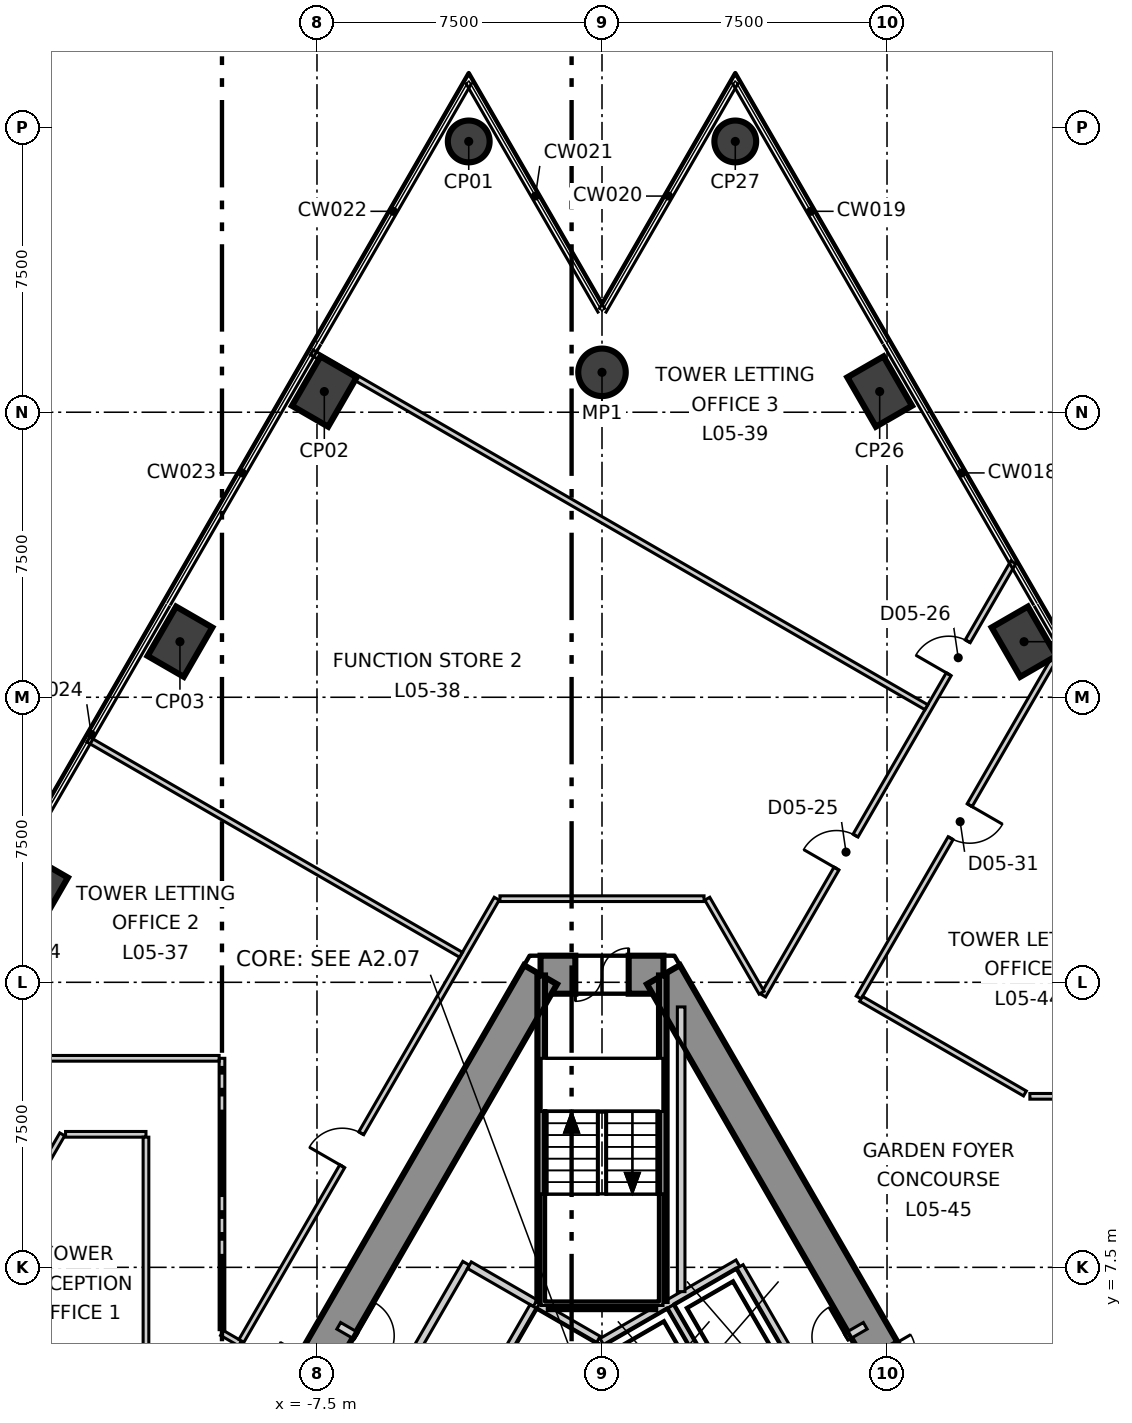
"""IFC4 building model, lengths in metres.
Left out: names, types, materials, properties, quantities, classifications, styles, units other than length and angle.
Written with IfcOpenShell. Run it as: python <this file> out.ifc"""

import sys

from ifc_helpers import new_model, si_unit, direction, frame, frame_2d, origin, origin_2d, place, context, subcontext, project, spatial, polyline, rectangle, circle, outline, extrude, element, fill, save


model = new_model("IFC4")
c1 = context("Model", 3, precision=1e-05, world=origin(), true_north=direction((0.0, 1.0)))
c2 = subcontext(c1, "Body", "Model", "MODEL_VIEW")
j1 = project(units=[si_unit("LENGTHUNIT", "METRE"), si_unit("PLANEANGLEUNIT", "RADIAN")], contexts=[c1])
p1 = place(None, origin())
s1 = spatial("IfcSite", under=j1, at=p1, CompositionType="ELEMENT")
p2 = place(p1, origin())
s2 = spatial("IfcBuilding", under=s1, at=p2, CompositionType="ELEMENT")
p3 = place(p2, frame((0.0, 0.0, 30.3)))
s3 = spatial("IfcBuildingStorey", under=s2, at=p3, CompositionType="ELEMENT", Elevation=30.3)
p4 = place(p3, frame((1.617, 15.2, -0.4), z_axis=(0.0, 0.0, 1.0), x_axis=(-1.0, 0.0, 0.0)))
e1 = element("IfcWall", 1, at=p4, inside=s3, PredefinedType="SHEAR", context=c2, shape_type="SweptSolid", body=[
    extrude(outline(polyline([(-0.288, -0.5), (1.617, -0.5), (3.522, -0.5), (2.945, 0.5), (1.617, 0.5), (0.289, 0.5), (-0.288, -0.5)])), origin(), (0.0, 0.0, 1.0), 5.1),
])
p5 = place(p4, frame((0.917, 0.0, 0.4)))
e2 = element("IfcOpeningElement", 2, at=p5, cuts=e1, PredefinedType="OPENING", context=c2, shape_type="SweptSolid", body=[
    extrude(rectangle(XDim=1.4, YDim=2.1, at=frame_2d((0.7, 1.05))), frame((0.0, 0.51, 0.0), z_axis=(0.0, -1.0, 0.0), x_axis=(1.0, 0.0, 0.0)), (0.0, 0.0, 1.0), 1.02),
])
p6 = place(p3, frame((-1.617, 15.2, -0.4), z_axis=(0.0, 0.0, 1.0), x_axis=(-0.499992141631, -0.866029940768, 0.0)))
e3 = element("IfcWall", 3, at=p6, inside=s3, PredefinedType="SHEAR", context=c2, shape_type="SweptSolid", body=[
    extrude(outline(polyline([(-0.289, -0.499), (1.656, -0.499), (3.601, -0.499), (5.547, -0.499), (7.492, -0.499), (9.437, -0.5), (11.382, -0.5), (13.328, -0.5), (15.273, -0.5), (17.218, -0.5), (19.163, -0.5), (21.109, -0.5), (23.054, -0.5), (24.999, -0.5), (24.422, 0.5), (22.566, 0.5), (20.709, 0.5), (18.853, 0.5), (16.997, 0.5), (15.14, 0.5), (13.284, 0.5), (11.427, 0.5), (9.571, 0.5), (7.715, 0.5), (5.858, 0.5), (4.002, 0.5), (2.146, 0.5), (0.289, 0.5), (-0.289, -0.499)])), origin(), (0.0, 0.0, 1.0), 5.1),
])
p7 = place(p6, frame((11.805, 0.0, 0.4)))
e4 = element("IfcOpeningElement", 4, at=p7, cuts=e3, PredefinedType="OPENING", context=c2, shape_type="SweptSolid", body=[
    extrude(rectangle(XDim=1.1, YDim=2.1, at=frame_2d((0.55, 1.05))), frame((0.0, 0.51, 0.0), z_axis=(0.0, -1.0, 0.0), x_axis=(1.0, 0.0, 0.0)), (0.0, 0.0, 1.0), 1.02),
])
p8 = place(p3, frame((13.972, -6.2, -0.4), z_axis=(0.0, 0.0, 1.0), x_axis=(-0.499992141631, 0.866029940768, 0.0)))
e5 = element("IfcWall", 5, at=p8, inside=s3, PredefinedType="SHEAR", context=c2, shape_type="SweptSolid", body=[
    extrude(outline(polyline([(-0.288, -0.5), (1.657, -0.5), (3.602, -0.5), (5.547, -0.5), (7.493, -0.5), (9.438, -0.5), (11.383, -0.5), (13.328, -0.5), (15.273, -0.5), (17.218, -0.499), (19.164, -0.499), (21.109, -0.499), (23.054, -0.499), (24.999, -0.499), (24.422, 0.5), (22.566, 0.5), (20.709, 0.5), (18.853, 0.5), (16.996, 0.5), (15.14, 0.5), (13.283, 0.5), (11.427, 0.5), (9.57, 0.5), (7.714, 0.5), (5.857, 0.5), (4.001, 0.5), (2.145, 0.5), (0.288, 0.5), (-0.288, -0.5)])), origin(), (0.0, 0.0, 1.0), 5.1),
])
p9 = place(p8, frame((11.455, 0.0, 0.4)))
e6 = element("IfcOpeningElement", 6, at=p9, cuts=e5, PredefinedType="OPENING", context=c2, shape_type="SweptSolid", body=[
    extrude(rectangle(XDim=1.8, YDim=2.1, at=frame_2d((0.9, 1.05))), frame((0.0, 0.51, 0.0), z_axis=(0.0, -1.0, 0.0), x_axis=(1.0, 0.0, 0.0)), (0.0, 0.0, 1.0), 1.02),
])
p10 = place(p3, frame((-3.507, 37.125, -0.4), z_axis=(0.0, 0.0, 1.0), x_axis=(0.5, 0.866025403784, 0.0)))
e7 = element("IfcColumn", 7, at=p10, inside=s3, PredefinedType="COLUMN", context=c2, shape_type="SweptSolid", body=[
    extrude(circle(Radius=0.55, at=origin_2d()), origin(), (0.0, 0.0, 1.0), 5.1),
])
for number, where, z_axis, x_axis in (
    (8, (-7.307, 30.544, -0.4), (0.0, 0.0, 1.0), (0.5, 0.866, 0.0)),
    (9, (-11.106, 23.962, -0.4), (0.0, 0.0, 1.0), (0.5, 0.866, 0.0)),
    (10, (-14.906, 17.381, -0.4), (0.0, 0.0, 1.0), (0.5, 0.866, 0.0)),
    (11, (11.106, 23.962, -0.4), (0.0, 0.0, 1.0), (-0.5, 0.866, 0.0)),
    (12, (7.307, 30.544, -0.4), (0.0, 0.0, 1.0), (-0.5, 0.866, 0.0)),
):
    element("IfcColumn", number, at=place(p3, frame(where, z_axis=z_axis, x_axis=x_axis)), inside=s3, PredefinedType="COLUMN", context=c2, shape_type="SweptSolid", body=[
        extrude(rectangle(XDim=1.5, YDim=1.1, at=origin_2d()), origin(), (0.0, 0.0, 1.0), 5.1),
    ])
p11 = place(p3, frame((3.507, 37.125, -0.4), z_axis=(0.0, 0.0, 1.0), x_axis=(-0.5, 0.866025403784, 0.0)))
e13 = element("IfcColumn", 13, at=p11, inside=s3, PredefinedType="COLUMN", context=c2, shape_type="SweptSolid", body=[
    extrude(circle(Radius=0.55, at=origin_2d()), origin(), (0.0, 0.0, 1.0), 5.1),
])
p12 = place(p3, frame((0.0, 31.05, -0.4), z_axis=(0.0, 0.0, 1.0), x_axis=(1.0, 0.0, 0.0)))
e14 = element("IfcColumn", 14, at=p12, inside=s3, PredefinedType="COLUMN", context=c2, shape_type="SweptSolid", body=[
    extrude(circle(Radius=0.625, at=origin_2d()), origin(), (0.0, 0.0, 1.0), 5.1),
])
p13 = place(p3, frame((-10.0, 5.773, 0.0), z_axis=(0.0, 0.0, 1.0), x_axis=(0.866645846342, -0.498923818852, 0.0)))
e15 = element("IfcWall", 15, at=p13, inside=s3, PredefinedType="PARTITIONING", context=c2, shape_type="SweptSolid", body=[
    extrude(rectangle(XDim=0.547, YDim=0.15, at=frame_2d((0.273, 0.0))), origin(), (0.0, 0.0, 1.0), 4.2),
])
p14 = place(p3, frame((-9.489, 5.565, 0.0), z_axis=(0.0, 0.0, 1.0), x_axis=(0.500030231307, 0.866007949028, 0.0)))
e16 = element("IfcWall", 16, at=p14, inside=s3, PredefinedType="PARTITIONING", context=c2, shape_type="SweptSolid", body=[
    extrude(rectangle(XDim=13.435, YDim=0.15, at=frame_2d((6.718, 0.0))), origin(), (0.0, 0.0, 1.0), 4.7),
])
p15 = place(p14, frame((5.307, 0.0, 0.0)))
e17 = element("IfcOpeningElement", 17, at=p15, cuts=e16, PredefinedType="OPENING", context=c2, shape_type="SweptSolid", body=[
    extrude(rectangle(XDim=1.0, YDim=2.1, at=frame_2d((0.5, 1.05))), frame((0.0, 0.085, 0.0), z_axis=(0.0, -1.0, 0.0), x_axis=(1.0, 0.0, 0.0)), (0.0, 0.0, 1.0), 0.17),
])
p16 = place(p3, frame((4.242, 14.652, 0.0), z_axis=(0.0, 0.0, 1.0), x_axis=(0.500016782699, 0.866015714072, 0.0)))
e18 = element("IfcWall", 18, at=p16, inside=s3, PredefinedType="PARTITIONING", context=c2, shape_type="SweptSolid", body=[
    extrude(rectangle(XDim=13.164, YDim=0.15, at=frame_2d((6.582, 0.0))), origin(), (0.0, 0.0, 1.0), 4.7),
])
p17 = place(p16, frame((3.858, 0.0, 0.0)))
e19 = element("IfcOpeningElement", 19, at=p17, cuts=e18, PredefinedType="OPENING", context=c2, shape_type="SweptSolid", body=[
    extrude(rectangle(XDim=1.0, YDim=2.1, at=frame_2d((0.5, 1.05))), frame((0.0, 0.085, 0.0), z_axis=(0.0, -1.0, 0.0), x_axis=(1.0, 0.0, 0.0)), (0.0, 0.0, 1.0), 0.17),
])
p18 = place(p16, frame((9.763, 0.0, 0.0)))
e20 = element("IfcOpeningElement", 20, at=p18, cuts=e18, PredefinedType="OPENING", context=c2, shape_type="SweptSolid", body=[
    extrude(rectangle(XDim=1.0, YDim=2.1, at=frame_2d((0.5, 1.05))), frame((0.0, 0.085, 0.0), z_axis=(0.0, -1.0, 0.0), x_axis=(1.0, 0.0, 0.0)), (0.0, 0.0, 1.0), 0.17),
])
p19 = place(p3, frame((-10.0, 5.86, 0.0), z_axis=(0.0, 0.0, 1.0), x_axis=(0.0, 1.0, 0.0)))
e21 = element("IfcWall", 21, at=p19, inside=s3, PredefinedType="PARTITIONING", context=c2, shape_type="SweptSolid", body=[
    extrude(rectangle(XDim=7.14, YDim=0.15, at=frame_2d((3.57, 0.0))), origin(), (0.0, 0.0, 1.0), 4.7),
])
p20 = place(p3, frame((-15.271, 13.0, 0.0), z_axis=(0.0, 0.0, 1.0), x_axis=(1.0, 0.0, 0.0)))
e22 = element("IfcWall", 22, at=p20, inside=s3, PredefinedType="PARTITIONING", context=c2, shape_type="SweptSolid", body=[
    extrude(rectangle(XDim=5.196, YDim=0.15, at=frame_2d((2.598, 0.0))), origin(), (0.0, 0.0, 1.0), 4.7),
])
p21 = place(p3, frame((6.754, 14.601, 0.0), z_axis=(0.0, 0.0, 1.0), x_axis=(0.499932177464, 0.866064557603, 0.0)))
e23 = element("IfcWall", 23, at=p21, inside=s3, PredefinedType="PARTITIONING", context=c2, shape_type="SweptSolid", body=[
    extrude(rectangle(XDim=10.682, YDim=0.15, at=frame_2d((5.341, 0.0))), origin(), (0.0, 0.0, 1.0), 4.1),
])
p22 = place(p21, frame((4.841, 0.0, 0.0)))
e24 = element("IfcOpeningElement", 24, at=p22, cuts=e23, PredefinedType="OPENING", context=c2, shape_type="SweptSolid", body=[
    extrude(rectangle(XDim=1.0, YDim=2.1, at=frame_2d((0.5, 1.05))), frame((0.0, 0.085, 0.0), z_axis=(0.0, -1.0, 0.0), x_axis=(1.0, 0.0, 0.0)), (0.0, 0.0, 1.0), 0.17),
])
p23 = place(p3, frame((-13.517, 21.387, 0.0), z_axis=(0.0, 0.0, 1.0), x_axis=(0.866036235619, -0.499981238243, 0.0)))
e25 = element("IfcWall", 25, at=p23, inside=s3, PredefinedType="PARTITIONING", context=c2, shape_type="SweptSolid", body=[
    extrude(rectangle(XDim=11.324, YDim=0.15, at=frame_2d((5.662, 0.0))), origin(), (0.0, 0.0, 1.0), 4.7),
])
p24 = place(p3, frame((-7.635, 31.575, 0.0), z_axis=(0.0, 0.0, 1.0), x_axis=(0.866010527476, -0.500025765638, 0.0)))
e26 = element("IfcWall", 26, at=p24, inside=s3, PredefinedType="PARTITIONING", context=c2, shape_type="SweptSolid", body=[
    extrude(rectangle(XDim=18.673, YDim=0.15, at=frame_2d((9.336, 0.0))), origin(), (0.0, 0.0, 1.0), 4.7),
])
p25 = place(p3, frame((2.771, 17.2, 0.0), z_axis=(0.0, 0.0, 1.0), x_axis=(0.500065346707, -0.865987672558, 0.0)))
e27 = element("IfcWall", 27, at=p25, inside=s3, PredefinedType="PARTITIONING", context=c2, shape_type="SweptSolid", body=[
    extrude(rectangle(XDim=2.855, YDim=0.15, at=frame_2d((1.428, 0.0))), origin(), (0.0, 0.0, 1.0), 4.7),
])
p26 = place(p3, frame((-2.685, 17.2, 0.0), z_axis=(0.0, 0.0, 1.0), x_axis=(1.0, 0.0, 0.0)))
e28 = element("IfcWall", 28, at=p26, inside=s3, PredefinedType="PARTITIONING", context=c2, shape_type="SweptSolid", body=[
    extrude(rectangle(XDim=5.37, YDim=0.15, at=frame_2d((2.685, 0.0))), origin(), (0.0, 0.0, 1.0), 4.7),
])
p27 = place(p3, frame((11.259, 12.0, 0.0), z_axis=(0.0, 0.0, 1.0), x_axis=(1.0, 0.0, 0.0)))
e29 = element("IfcWall", 29, at=p27, inside=s3, PredefinedType="PARTITIONING", context=c2, shape_type="SweptSolid", body=[
    extrude(rectangle(XDim=4.589, YDim=0.15, at=frame_2d((2.294, 0.0))), origin(), (0.0, 0.0, 1.0), 4.7),
])
p28 = place(p3, frame((6.819, 14.564, 0.0), z_axis=(0.0, 0.0, 1.0), x_axis=(0.865960914513, -0.500111682063, 0.0)))
e30 = element("IfcWall", 30, at=p28, inside=s3, PredefinedType="PARTITIONING", context=c2, shape_type="SweptSolid", body=[
    extrude(rectangle(XDim=4.977, YDim=0.15, at=frame_2d((2.488, 0.0))), origin(), (0.0, 0.0, 1.0), 4.7),
])
p29 = place(p3, frame((-19.356, 2.075, 0.0), z_axis=(0.0, 0.0, 1.0), x_axis=(0.500014323953, 0.866017133688, 0.0)))
e31 = element("IfcWall", 31, at=p29, inside=s3, PredefinedType="PARTITIONING", context=c2, shape_type="SweptSolid", body=[
    extrude(rectangle(XDim=10.306, YDim=0.15, at=frame_2d((5.153, 0.0))), origin(), (0.0, 0.0, 1.0), 4.7),
])
p30 = place(p29, frame((4.61, 0.0, 0.0)))
e32 = element("IfcOpeningElement", 32, at=p30, cuts=e31, PredefinedType="OPENING", context=c2, shape_type="SweptSolid", body=[
    extrude(rectangle(XDim=1.0, YDim=2.1, at=frame_2d((0.5, 1.05))), frame((0.0, 0.085, 0.0), z_axis=(0.0, -1.0, 0.0), x_axis=(1.0, 0.0, 0.0)), (0.0, 0.0, 1.0), 0.17),
])
p31 = place(p3, frame((-14.116, 11.0, 0.0), z_axis=(0.0, 0.0, 1.0), x_axis=(1.0, 0.0, 0.0)))
e33 = element("IfcWall", 33, at=p31, inside=s3, PredefinedType="PARTITIONING", context=c2, shape_type="SweptSolid", body=[
    extrude(rectangle(XDim=2.116, YDim=0.15, at=frame_2d((1.058, 0.0))), origin(), (0.0, 0.0, 1.0), 4.7),
])
p32 = place(p3, frame((-12.0, 3.765, 0.0), z_axis=(0.0, 0.0, 1.0), x_axis=(0.0, 1.0, 0.0)))
e34 = element("IfcWall", 34, at=p32, inside=s3, PredefinedType="PARTITIONING", context=c2, shape_type="SweptSolid", body=[
    extrude(rectangle(XDim=7.16, YDim=0.15, at=frame_2d((3.58, 0.0))), origin(), (0.0, 0.0, 1.0), 4.7),
])
p33 = place(p3, frame((-0.002, 5.541, 0.0), z_axis=(0.0, 0.0, 1.0), x_axis=(0.86600155993, 0.500041296494, 0.0)))
e35 = element("IfcWall", 35, at=p33, inside=s3, PredefinedType="SOLIDWALL", context=c2, shape_type="SweptSolid", body=[
    extrude(rectangle(XDim=4.132, YDim=0.2, at=frame_2d((2.066, 0.0))), origin(), (0.0, 0.0, 1.0), 4.7),
])
p34 = place(p3, frame((1.578, 2.874, 0.0), z_axis=(0.0, 0.0, 1.0), x_axis=(0.866055259465, 0.499948284879, 0.0)))
e36 = element("IfcWall", 36, at=p34, inside=s3, PredefinedType="SOLIDWALL", context=c2, shape_type="SweptSolid", body=[
    extrude(rectangle(XDim=6.177, YDim=0.2, at=frame_2d((3.088, 0.0))), origin(), (0.0, 0.0, 1.0), 4.7),
])
p35 = place(p34, frame((2.496, 0.0, 0.0)))
e37 = element("IfcOpeningElement", 37, at=p35, cuts=e36, PredefinedType="OPENING", context=c2, shape_type="SweptSolid", body=[
    extrude(rectangle(XDim=1.1, YDim=2.1, at=frame_2d((0.55, 1.05))), frame((0.0, 0.11, 0.0), z_axis=(0.0, -1.0, 0.0), x_axis=(1.0, 0.0, 0.0)), (0.0, 0.0, 1.0), 0.22),
])
p36 = place(p34, frame((4.696, 0.0, 0.0)))
e38 = element("IfcOpeningElement", 38, at=p36, cuts=e36, PredefinedType="OPENING", context=c2, shape_type="SweptSolid", body=[
    extrude(rectangle(XDim=0.9, YDim=2.1, at=frame_2d((0.45, 1.05))), frame((0.0, 0.11, 0.0), z_axis=(0.0, -1.0, 0.0), x_axis=(1.0, 0.0, 0.0)), (0.0, 0.0, 1.0), 0.22),
])
for number, where, z_axis, x_axis in (
    (39, (1.807, 6.47, 0.0), (0.0, 0.0, 1.0), (0.5, -0.866, 0.0)),
    (40, (3.626, 7.52, 0.0), (0.0, 0.0, 1.0), (0.5, -0.866, 0.0)),
):
    element("IfcWall", number, at=place(p3, frame(where, z_axis=z_axis, x_axis=x_axis)), inside=s3, PredefinedType="SOLIDWALL", context=c2, shape_type="SweptSolid", body=[
        extrude(rectangle(XDim=2.9, YDim=0.2, at=frame_2d((1.45, 0.0))), origin(), (0.0, 0.0, 1.0), 4.7),
    ])
p37 = place(p3, frame((-6.927, 5.962, 0.0), z_axis=(0.0, 0.0, 1.0), x_axis=(0.866065051207, -0.49993132236, 0.0)))
e41 = element("IfcWall", 41, at=p37, inside=s3, PredefinedType="SOLIDWALL", context=c2, shape_type="SweptSolid", body=[
    extrude(rectangle(XDim=4.182, YDim=0.2, at=frame_2d((2.091, 0.0))), origin(), (0.0, 0.0, 1.0), 4.7),
])
p38 = place(p37, frame((2.68, 0.0, 0.0)))
e42 = element("IfcOpeningElement", 42, at=p38, cuts=e41, PredefinedType="OPENING", context=c2, shape_type="SweptSolid", body=[
    extrude(rectangle(XDim=0.9, YDim=2.1, at=frame_2d((0.45, 1.05))), frame((0.0, 0.11, 0.0), z_axis=(0.0, -1.0, 0.0), x_axis=(1.0, 0.0, 0.0)), (0.0, 0.0, 1.0), 0.22),
])
p39 = place(p37, frame((0.53, 0.0, 0.0)))
e43 = element("IfcOpeningElement", 43, at=p39, cuts=e41, PredefinedType="OPENING", context=c2, shape_type="SweptSolid", body=[
    extrude(rectangle(XDim=1.0, YDim=2.1, at=frame_2d((0.5, 1.05))), frame((0.0, 0.11, 0.0), z_axis=(0.0, -1.0, 0.0), x_axis=(1.0, 0.0, 0.0)), (0.0, 0.0, 1.0), 0.22),
])
p40 = place(p3, frame((-5.076, 5.009, 0.0), z_axis=(0.0, 0.0, 1.0), x_axis=(0.50002537861, 0.866010750942, 0.0)))
e44 = element("IfcWall", 44, at=p40, inside=s3, PredefinedType="SOLIDWALL", context=c2, shape_type="SweptSolid", body=[
    extrude(rectangle(XDim=3.0, YDim=0.2, at=frame_2d((1.5, 0.0))), origin(), (0.0, 0.0, 1.0), 4.7),
])
p41 = place(p3, frame((-3.489, 7.557, 0.0), z_axis=(0.0, 0.0, 1.0), x_axis=(0.866010750942, -0.50002537861, 0.0)))
e45 = element("IfcWall", 45, at=p41, inside=s3, PredefinedType="SOLIDWALL", context=c2, shape_type="SweptSolid", body=[
    extrude(rectangle(XDim=2.0, YDim=0.2, at=frame_2d((1.0, 0.0))), origin(), (0.0, 0.0, 1.0), 4.7),
])
p42 = place(p3, frame((-3.257, 3.959, 0.0), z_axis=(0.0, 0.0, 1.0), x_axis=(0.50012328804, 0.865954211699, 0.0)))
e46 = element("IfcWall", 46, at=p42, inside=s3, PredefinedType="SOLIDWALL", context=c2, shape_type="SweptSolid", body=[
    extrude(rectangle(XDim=2.9, YDim=0.2, at=frame_2d((1.45, 0.0))), origin(), (0.0, 0.0, 1.0), 4.7),
])
p43 = place(p3, frame((-1.67, 6.507, 0.0), z_axis=(0.0, 0.0, 1.0), x_axis=(0.865941441609, -0.500145398563, 0.0)))
e47 = element("IfcWall", 47, at=p43, inside=s3, PredefinedType="SOLIDWALL", context=c2, shape_type="SweptSolid", body=[
    extrude(rectangle(XDim=1.815, YDim=0.2, at=frame_2d((0.908, 0.0))), origin(), (0.0, 0.0, 1.0), 4.7),
])
p44 = place(p3, frame((2.083, 6.861, 0.0), z_axis=(0.0, 0.0, 1.0), x_axis=(0.0, 1.0, 0.0)))
e48 = element("IfcWall", 48, at=p44, inside=s3, PredefinedType="SOLIDWALL", context=c2, shape_type="SweptSolid", body=[
    extrude(rectangle(XDim=7.491, YDim=0.2, at=frame_2d((3.746, 0.0))), origin(), (0.0, 0.0, 1.0), 4.7),
])
p45 = place(p3, frame((1.6, 6.615, 0.0), z_axis=(0.0, 0.0, 1.0), x_axis=(0.0, 1.0, 0.0)))
e49 = element("IfcWall", 49, at=p45, inside=s3, PredefinedType="SOLIDWALL", context=c2, shape_type="SweptSolid", body=[
    extrude(rectangle(XDim=8.565, YDim=0.2, at=frame_2d((4.282, 0.0))), origin(), (0.0, 0.0, 1.0), 4.7),
])
p46 = place(p3, frame((-1.4, 6.5, 0.0), z_axis=(0.0, 0.0, 1.0), x_axis=(1.0, 0.0, 0.0)))
e50 = element("IfcWall", 50, at=p46, inside=s3, PredefinedType="SOLIDWALL", context=c2, shape_type="SweptSolid", body=[
    extrude(rectangle(XDim=2.8, YDim=0.2, at=frame_2d((1.4, 0.0))), origin(), (0.0, 0.0, 1.0), 4.7),
])
p47 = place(p3, frame((-1.6, 6.615, 0.0), z_axis=(0.0, 0.0, 1.0), x_axis=(0.0, 1.0, 0.0)))
e51 = element("IfcWall", 51, at=p47, inside=s3, PredefinedType="SOLIDWALL", context=c2, shape_type="SweptSolid", body=[
    extrude(rectangle(XDim=8.565, YDim=0.2, at=frame_2d((4.282, 0.0))), origin(), (0.0, 0.0, 1.0), 4.7),
])
p48 = place(p15, origin())
e52 = element("IfcDoor", 52, at=p48, inside=s3, OperationType="SINGLE_SWING_RIGHT", PredefinedType="DOOR", context=c2, shape_type="SweptSolid", body=[
    extrude(rectangle(XDim=1.0, YDim=2.1, at=frame_2d((0.5, 1.05))), frame((0.0, 0.025, 0.0), z_axis=(0.0, -1.0, 0.0), x_axis=(1.0, 0.0, 0.0)), (0.0, 0.0, 1.0), 0.05),
])
fill(e17, e52)
p49 = place(p17, origin())
e53 = element("IfcDoor", 53, at=p49, inside=s3, OperationType="SINGLE_SWING_RIGHT", PredefinedType="DOOR", context=c2, shape_type="SweptSolid", body=[
    extrude(rectangle(XDim=1.0, YDim=2.1, at=frame_2d((0.5, 1.05))), frame((0.0, 0.025, 0.0), z_axis=(0.0, -1.0, 0.0), x_axis=(1.0, 0.0, 0.0)), (0.0, 0.0, 1.0), 0.05),
])
fill(e19, e53)
p50 = place(p18, origin())
e54 = element("IfcDoor", 54, at=p50, inside=s3, OperationType="SINGLE_SWING_RIGHT", PredefinedType="DOOR", context=c2, shape_type="SweptSolid", body=[
    extrude(rectangle(XDim=1.0, YDim=2.1, at=frame_2d((0.5, 1.05))), frame((0.0, 0.025, 0.0), z_axis=(0.0, -1.0, 0.0), x_axis=(1.0, 0.0, 0.0)), (0.0, 0.0, 1.0), 0.05),
])
fill(e20, e54)
p51 = place(p22, origin())
e55 = element("IfcDoor", 55, at=p51, inside=s3, OperationType="SINGLE_SWING_RIGHT", PredefinedType="DOOR", context=c2, shape_type="SweptSolid", body=[
    extrude(rectangle(XDim=1.0, YDim=2.1, at=frame_2d((0.5, 1.05))), frame((0.0, 0.025, 0.0), z_axis=(0.0, -1.0, 0.0), x_axis=(1.0, 0.0, 0.0)), (0.0, 0.0, 1.0), 0.05),
])
fill(e24, e55)
p52 = place(p5, origin())
e56 = element("IfcDoor", 56, at=p52, inside=s3, OperationType="DOUBLE_DOOR_SINGLE_SWING", PredefinedType="DOOR", context=c2, shape_type="SweptSolid", body=[
    extrude(rectangle(XDim=1.4, YDim=2.1, at=frame_2d((0.7, 1.05))), frame((0.0, 0.025, 0.0), z_axis=(0.0, -1.0, 0.0), x_axis=(1.0, 0.0, 0.0)), (0.0, 0.0, 1.0), 0.05),
])
fill(e2, e56)
p53 = place(p39, origin())
e57 = element("IfcDoor", 57, at=p53, inside=s3, OperationType="SINGLE_SWING_RIGHT", PredefinedType="DOOR", context=c2, shape_type="SweptSolid", body=[
    extrude(rectangle(XDim=1.0, YDim=2.1, at=frame_2d((0.5, 1.05))), frame((0.0, 0.025, 0.0), z_axis=(0.0, -1.0, 0.0), x_axis=(1.0, 0.0, 0.0)), (0.0, 0.0, 1.0), 0.05),
])
fill(e43, e57)
p54 = place(p36, origin())
e58 = element("IfcDoor", 58, at=p54, inside=s3, OperationType="SINGLE_SWING_LEFT", PredefinedType="DOOR", context=c2, shape_type="SweptSolid", body=[
    extrude(rectangle(XDim=0.9, YDim=2.1, at=frame_2d((0.45, 1.05))), frame((0.0, 0.025, 0.0), z_axis=(0.0, -1.0, 0.0), x_axis=(1.0, 0.0, 0.0)), (0.0, 0.0, 1.0), 0.05),
])
fill(e38, e58)
save(model, sys.argv[1])
